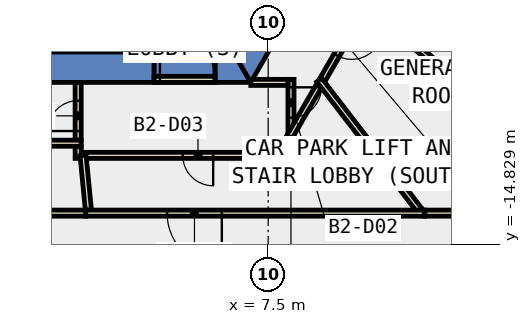
"""IFC4 building model, lengths in metres.
Left out: names, types, materials, properties, quantities, classifications, styles, units other than length and angle.
Written with IfcOpenShell. Run it as: python <this file> out.ifc"""

import sys

from ifc_helpers import new_model, si_unit, direction, frame, frame_2d, origin, place, context, subcontext, project, spatial, polyline, rectangle, outline, extrude, element, fill, save


model = new_model("IFC4")
c1 = context("Model", 3, precision=1e-05, world=origin(), true_north=direction((0.0, 1.0)))
c2 = subcontext(c1, "Body", "Model", "MODEL_VIEW")
j1 = project(units=[si_unit("LENGTHUNIT", "METRE"), si_unit("PLANEANGLEUNIT", "RADIAN")], contexts=[c1])
p1 = place(None, origin())
s1 = spatial("IfcSite", under=j1, at=p1, CompositionType="ELEMENT")
p2 = place(p1, origin())
s2 = spatial("IfcBuilding", under=s1, at=p2, CompositionType="ELEMENT")
p3 = place(p2, frame((0.0, 0.0, -11.0)))
s3 = spatial("IfcBuildingStorey", under=s2, at=p3, CompositionType="ELEMENT", Elevation=-11.0)
p4 = place(p3, frame((0.0, 0.0, -0.42)))
e1 = element("IfcWall", 1, at=p4, inside=s3, PredefinedType="SHEAR", context=c2, shape_type="SweptSolid", body=[
    extrude(outline(polyline([(3.75, -9.5), (3.75, -8.5), (-6.351, -8.5), (-6.928, -9.5), (3.75, -9.5)])), origin(), (0.0, 0.0, 1.0), 5.5),
])
p5 = place(p3, frame((0.0, 0.0, -0.42)))
e2 = element("IfcWall", 2, at=p5, inside=s3, PredefinedType="SHEAR", context=c2, shape_type="SweptSolid", body=[
    extrude(outline(polyline([(5.75, -8.5), (5.75, -9.5), (6.928, -9.5), (6.351, -8.5), (5.75, -8.5)])), origin(), (0.0, 0.0, 1.0), 5.5),
])
p6 = place(p3, frame((0.0, 0.0, 3.6)))
e3 = element("IfcWall", 3, at=p6, inside=s3, PredefinedType="SHEAR", context=c2, shape_type="SweptSolid", body=[
    extrude(outline(polyline([(5.75, -9.5), (5.75, -8.5), (3.75, -8.5), (3.75, -9.5), (5.75, -9.5)])), origin(), (0.0, 0.0, 1.0), 1.48),
])
p7 = place(p3, frame((0.0, 0.0, -0.42)))
e4 = element("IfcWall", 4, at=p7, inside=s3, PredefinedType="SHEAR", context=c2, shape_type="SweptSolid", body=[
    extrude(outline(polyline([(6.928, -9.5), (13.856, 2.5), (12.702, 2.5), (6.351, -8.5), (6.928, -9.5)])), origin(), (0.0, 0.0, 1.0), 5.5),
])
p8 = place(p3, frame((9.31, -5.375, -0.42), z_axis=(0.0, 0.0, 1.0), x_axis=(0.866017533419, -0.500013631625, 0.0)))
e5 = element("IfcWall", 5, at=p8, inside=s3, PredefinedType="SHEAR", context=c2, shape_type="SweptSolid", body=[
    extrude(rectangle(XDim=9.0, YDim=0.8, at=frame_2d((4.5, 0.0))), origin(), (0.0, 0.0, 1.0), 5.5),
])
p9 = place(p3, frame((1.25, -11.4, 0.0), z_axis=(0.0, 0.0, 1.0), x_axis=(0.0, 1.0, 0.0)))
e6 = element("IfcWall", 6, at=p9, inside=s3, PredefinedType="PARTITIONING", context=c2, shape_type="SweptSolid", body=[
    extrude(rectangle(XDim=1.9, YDim=0.2, at=frame_2d((0.95, 0.0))), origin(), (0.0, 0.0, 1.0), 5.05),
])
p10 = place(p9, frame((0.3, 0.0, 0.0)))
e7 = element("IfcOpeningElement", 7, at=p10, cuts=e6, PredefinedType="OPENING", context=c2, shape_type="SweptSolid", body=[
    extrude(rectangle(XDim=1.0, YDim=2.1, at=frame_2d((0.5, 1.05))), frame((0.0, 0.11, 0.0), z_axis=(0.0, -1.0, 0.0), x_axis=(1.0, 0.0, 0.0)), (0.0, 0.0, 1.0), 0.22),
])
p11 = place(p3, frame((8.25, -9.4, 0.0), z_axis=(0.0, 0.0, 1.0), x_axis=(0.0, -1.0, 0.0)))
e8 = element("IfcWall", 8, at=p11, inside=s3, PredefinedType="PARTITIONING", context=c2, shape_type="SweptSolid", body=[
    extrude(rectangle(XDim=1.71, YDim=0.2, at=frame_2d((0.855, 0.0))), origin(), (0.0, 0.0, 1.0), 5.05),
])
p12 = place(p11, frame((0.262, 0.0, 0.0)))
e9 = element("IfcOpeningElement", 9, at=p12, cuts=e8, PredefinedType="OPENING", context=c2, shape_type="SweptSolid", body=[
    extrude(rectangle(XDim=1.0, YDim=2.1, at=frame_2d((0.5, 1.05))), frame((0.0, 0.11, 0.0), z_axis=(0.0, -1.0, 0.0), x_axis=(1.0, 0.0, 0.0)), (0.0, 0.0, 1.0), 0.22),
])
p13 = place(p3, frame((6.928, -9.5, 0.0), z_axis=(0.0, 0.0, 1.0), x_axis=(1.0, 0.0, 0.0)))
e10 = element("IfcWall", 10, at=p13, inside=s3, PredefinedType="PARTITIONING", context=c2, shape_type="SweptSolid", body=[
    extrude(rectangle(XDim=1.222, YDim=0.2, at=frame_2d((0.611, 0.0))), origin(), (0.0, 0.0, 1.0), 5.05),
])
p14 = place(p3, frame((8.25, -11.31, 0.0), z_axis=(0.0, 0.0, 1.0), x_axis=(0.0, -1.0, 0.0)))
e11 = element("IfcWall", 11, at=p14, inside=s3, PredefinedType="PARTITIONING", context=c2, shape_type="SweptSolid", body=[
    extrude(rectangle(XDim=0.49, YDim=0.2, at=frame_2d((0.245, 0.0))), origin(), (0.0, 0.0, 1.0), 5.05),
])
p15 = place(p3, frame((8.35, -11.9, 0.0), z_axis=(0.0, 0.0, 1.0), x_axis=(-1.0, 0.0, 0.0)))
e12 = element("IfcWall", 12, at=p15, inside=s3, PredefinedType="PARTITIONING", context=c2, shape_type="SweptSolid", body=[
    extrude(rectangle(XDim=7.039, YDim=0.2, at=frame_2d((3.52, 0.0))), origin(), (0.0, 0.0, 1.0), 5.05),
])
p16 = place(p15, frame((2.659, 0.0, 0.0)))
e13 = element("IfcOpeningElement", 13, at=p16, cuts=e12, PredefinedType="OPENING", context=c2, shape_type="SweptSolid", body=[
    extrude(rectangle(XDim=1.0, YDim=2.1, at=frame_2d((0.5, 1.05))), frame((0.0, 0.11, 0.0), z_axis=(0.0, -1.0, 0.0), x_axis=(1.0, 0.0, 0.0)), (0.0, 0.0, 1.0), 0.22),
])
p17 = place(p3, frame((1.25, -12.0, 0.0), z_axis=(0.0, 0.0, 1.0), x_axis=(0.0, 1.0, 0.0)))
e14 = element("IfcWall", 14, at=p17, inside=s3, PredefinedType="PARTITIONING", context=c2, shape_type="SweptSolid", body=[
    extrude(rectangle(XDim=0.4, YDim=0.2, at=frame_2d((0.2, 0.0))), origin(), (0.0, 0.0, 1.0), 5.05),
])
p18 = place(p3, frame((1.35, -11.5, 0.0), z_axis=(0.0, 0.0, 1.0), x_axis=(-1.0, 0.0, 0.0)))
e15 = element("IfcWall", 15, at=p18, inside=s3, PredefinedType="PARTITIONING", context=c2, shape_type="SweptSolid", body=[
    extrude(rectangle(XDim=8.646, YDim=0.2, at=frame_2d((4.323, 0.0))), origin(), (0.0, 0.0, 1.0), 5.05),
])
p19 = place(p18, frame((3.768, 0.0, 0.0)))
e16 = element("IfcOpeningElement", 16, at=p19, cuts=e15, PredefinedType="OPENING", context=c2, shape_type="SweptSolid", body=[
    extrude(rectangle(XDim=1.0, YDim=2.1, at=frame_2d((0.5, 1.05))), frame((0.0, 0.11, 0.0), z_axis=(0.0, -1.0, 0.0), x_axis=(1.0, 0.0, 0.0)), (0.0, 0.0, 1.0), 0.22),
])
p20 = place(p3, frame((9.238, -9.498, 0.0), z_axis=(0.0, 0.0, 1.0), x_axis=(-0.499780113518, -0.866152318089, 0.0)))
e17 = element("IfcWall", 17, at=p20, inside=s3, PredefinedType="PARTITIONING", context=c2, shape_type="SweptSolid", body=[
    extrude(rectangle(XDim=2.077, YDim=0.2, at=frame_2d((1.039, 0.0))), origin(), (0.0, 0.0, 1.0), 5.05),
])
p21 = place(p3, frame((10.738, -6.901, 0.0), z_axis=(0.0, 0.0, 1.0), x_axis=(-0.500131122175, -0.865949687125, 0.0)))
e18 = element("IfcWall", 18, at=p21, inside=s3, PredefinedType="PARTITIONING", context=c2, shape_type="SweptSolid", body=[
    extrude(rectangle(XDim=2.999, YDim=0.2, at=frame_2d((1.5, 0.0))), origin(), (0.0, 0.0, 1.0), 5.05),
])
p22 = place(p21, frame((0.972, 0.0, 0.0)))
e19 = element("IfcOpeningElement", 19, at=p22, cuts=e18, PredefinedType="OPENING", context=c2, shape_type="SweptSolid", body=[
    extrude(rectangle(XDim=1.0, YDim=2.1, at=frame_2d((0.5, 1.05))), frame((0.0, 0.11, 0.0), z_axis=(0.0, -1.0, 0.0), x_axis=(1.0, 0.0, 0.0)), (0.0, 0.0, 1.0), 0.22),
])
p23 = place(p3, frame((1.587, -13.7, 0.0), z_axis=(0.0, 0.0, 1.0), x_axis=(-0.097324991698, 0.99525265435, 0.0)))
e20 = element("IfcWall", 20, at=p23, inside=s3, PredefinedType="PARTITIONING", context=c2, shape_type="SweptSolid", body=[
    extrude(rectangle(XDim=1.809, YDim=0.2, at=frame_2d((0.904, 0.0))), origin(), (0.0, 0.0, 1.0), 5.05),
])
p24 = place(p3, frame((9.177, -9.419, 0.0), z_axis=(0.0, 0.0, 1.0), x_axis=(0.610158732695, -0.792279193792, 0.0)))
e21 = element("IfcWall", 21, at=p24, inside=s3, PredefinedType="PARTITIONING", context=c2, shape_type="SweptSolid", body=[
    extrude(rectangle(XDim=5.53, YDim=0.2, at=frame_2d((2.765, 0.0))), origin(), (0.0, 0.0, 1.0), 5.05),
])
p25 = place(p3, frame((12.651, -13.8, 0.0), z_axis=(0.0, 0.0, 1.0), x_axis=(-1.0, 0.0, 0.0)))
e22 = element("IfcWall", 22, at=p25, inside=s3, PredefinedType="PARTITIONING", context=c2, shape_type="SweptSolid", body=[
    extrude(rectangle(XDim=11.154, YDim=0.2, at=frame_2d((5.577, 0.0))), origin(), (0.0, 0.0, 1.0), 5.05),
])
p26 = place(p25, frame((6.675, 0.0, 0.0)))
e23 = element("IfcOpeningElement", 23, at=p26, cuts=e22, PredefinedType="OPENING", context=c2, shape_type="SweptSolid", body=[
    extrude(rectangle(XDim=1.8, YDim=2.1, at=frame_2d((0.9, 1.05))), frame((0.0, 0.11, 0.0), z_axis=(0.0, -1.0, 0.0), x_axis=(1.0, 0.0, 0.0)), (0.0, 0.0, 1.0), 0.22),
])
p27 = place(p3, frame((1.497, -13.8, 0.0), z_axis=(0.0, 0.0, 1.0), x_axis=(-1.0, 0.0, 0.0)))
e24 = element("IfcWall", 24, at=p27, inside=s3, PredefinedType="PARTITIONING", context=c2, shape_type="SweptSolid", body=[
    extrude(rectangle(XDim=9.775, YDim=0.2, at=frame_2d((4.888, 0.0))), origin(), (0.0, 0.0, 1.0), 5.05),
])
p28 = place(p3, frame((14.9, -13.8, 0.0), z_axis=(0.0, 0.0, 1.0), x_axis=(-1.0, 0.0, 0.0)))
e25 = element("IfcWall", 25, at=p28, inside=s3, PredefinedType="PARTITIONING", context=c2, shape_type="SweptSolid", body=[
    extrude(rectangle(XDim=2.249, YDim=0.2, at=frame_2d((1.125, 0.0))), origin(), (0.0, 0.0, 1.0), 5.05),
])
p29 = place(p3, frame((10.663, -6.835, 0.0), z_axis=(0.0, 0.0, 1.0), x_axis=(0.752269740493, -0.658855247788, 0.0)))
e26 = element("IfcWall", 26, at=p29, inside=s3, PredefinedType="PARTITIONING", context=c2, shape_type="SweptSolid", body=[
    extrude(rectangle(XDim=5.865, YDim=0.2, at=frame_2d((2.932, 0.0))), origin(), (0.0, 0.0, 1.0), 5.05),
])
p30 = place(p3, frame((3.75, -9.4, 0.0), z_axis=(0.0, 0.0, 1.0), x_axis=(1.0, 0.0, 0.0)))
e27 = element("IfcWall", 27, at=p30, inside=s3, PredefinedType="PARTITIONING", context=c2, shape_type="SweptSolid", body=[
    extrude(rectangle(XDim=2.0, YDim=0.2, at=frame_2d((1.0, 0.0))), origin(), (0.0, 0.0, 1.0), 2.4),
])
p31 = place(p30, frame((0.19, 0.0, 0.0)))
e28 = element("IfcOpeningElement", 28, at=p31, cuts=e27, PredefinedType="OPENING", context=c2, shape_type="SweptSolid", body=[
    extrude(rectangle(XDim=1.8, YDim=2.1, at=frame_2d((0.9, 1.05))), frame((0.0, 0.11, 0.0), z_axis=(0.0, -1.0, 0.0), x_axis=(1.0, 0.0, 0.0)), (0.0, 0.0, 1.0), 0.22),
])
p32 = place(p10, origin())
e29 = element("IfcDoor", 29, at=p32, inside=s3, OperationType="SINGLE_SWING_LEFT", PredefinedType="DOOR", context=c2, shape_type="SweptSolid", body=[
    extrude(rectangle(XDim=1.0, YDim=2.1, at=frame_2d((0.5, 1.05))), frame((0.0, 0.025, 0.0), z_axis=(0.0, -1.0, 0.0), x_axis=(1.0, 0.0, 0.0)), (0.0, 0.0, 1.0), 0.05),
])
fill(e7, e29)
p33 = place(p12, origin())
e30 = element("IfcDoor", 30, at=p33, inside=s3, OperationType="SINGLE_SWING_RIGHT", PredefinedType="DOOR", context=c2, shape_type="SweptSolid", body=[
    extrude(rectangle(XDim=1.0, YDim=2.1, at=frame_2d((0.5, 1.05))), frame((0.0, 0.025, 0.0), z_axis=(0.0, -1.0, 0.0), x_axis=(1.0, 0.0, 0.0)), (0.0, 0.0, 1.0), 0.05),
])
fill(e9, e30)
p34 = place(p16, origin())
e31 = element("IfcDoor", 31, at=p34, inside=s3, OperationType="SINGLE_SWING_LEFT", PredefinedType="DOOR", context=c2, shape_type="SweptSolid", body=[
    extrude(rectangle(XDim=1.0, YDim=2.1, at=frame_2d((0.5, 1.05))), frame((0.0, 0.025, 0.0), z_axis=(0.0, -1.0, 0.0), x_axis=(1.0, 0.0, 0.0)), (0.0, 0.0, 1.0), 0.05),
])
fill(e13, e31)
p35 = place(p22, origin())
e32 = element("IfcDoor", 32, at=p35, inside=s3, OperationType="SINGLE_SWING_RIGHT", PredefinedType="DOOR", context=c2, shape_type="SweptSolid", body=[
    extrude(rectangle(XDim=1.0, YDim=2.1, at=frame_2d((0.5, 1.05))), frame((0.0, 0.025, 0.0), z_axis=(0.0, -1.0, 0.0), x_axis=(1.0, 0.0, 0.0)), (0.0, 0.0, 1.0), 0.05),
])
fill(e19, e32)
p36 = place(p26, origin())
e33 = element("IfcDoor", 33, at=p36, inside=s3, OperationType="DOUBLE_DOOR_SINGLE_SWING", PredefinedType="DOOR", context=c2, shape_type="SweptSolid", body=[
    extrude(rectangle(XDim=1.8, YDim=2.1, at=frame_2d((0.9, 1.05))), frame((0.0, 0.025, 0.0), z_axis=(0.0, -1.0, 0.0), x_axis=(1.0, 0.0, 0.0)), (0.0, 0.0, 1.0), 0.05),
])
fill(e23, e33)
p37 = place(p31, origin())
e34 = element("IfcDoor", 34, at=p37, inside=s3, OperationType="DOUBLE_DOOR_SINGLE_SWING", PredefinedType="DOOR", context=c2, shape_type="SweptSolid", body=[
    extrude(rectangle(XDim=1.8, YDim=2.1, at=frame_2d((0.9, 1.05))), frame((0.0, 0.025, 0.0), z_axis=(0.0, -1.0, 0.0), x_axis=(1.0, 0.0, 0.0)), (0.0, 0.0, 1.0), 0.05),
])
fill(e28, e34)
save(model, sys.argv[1])
